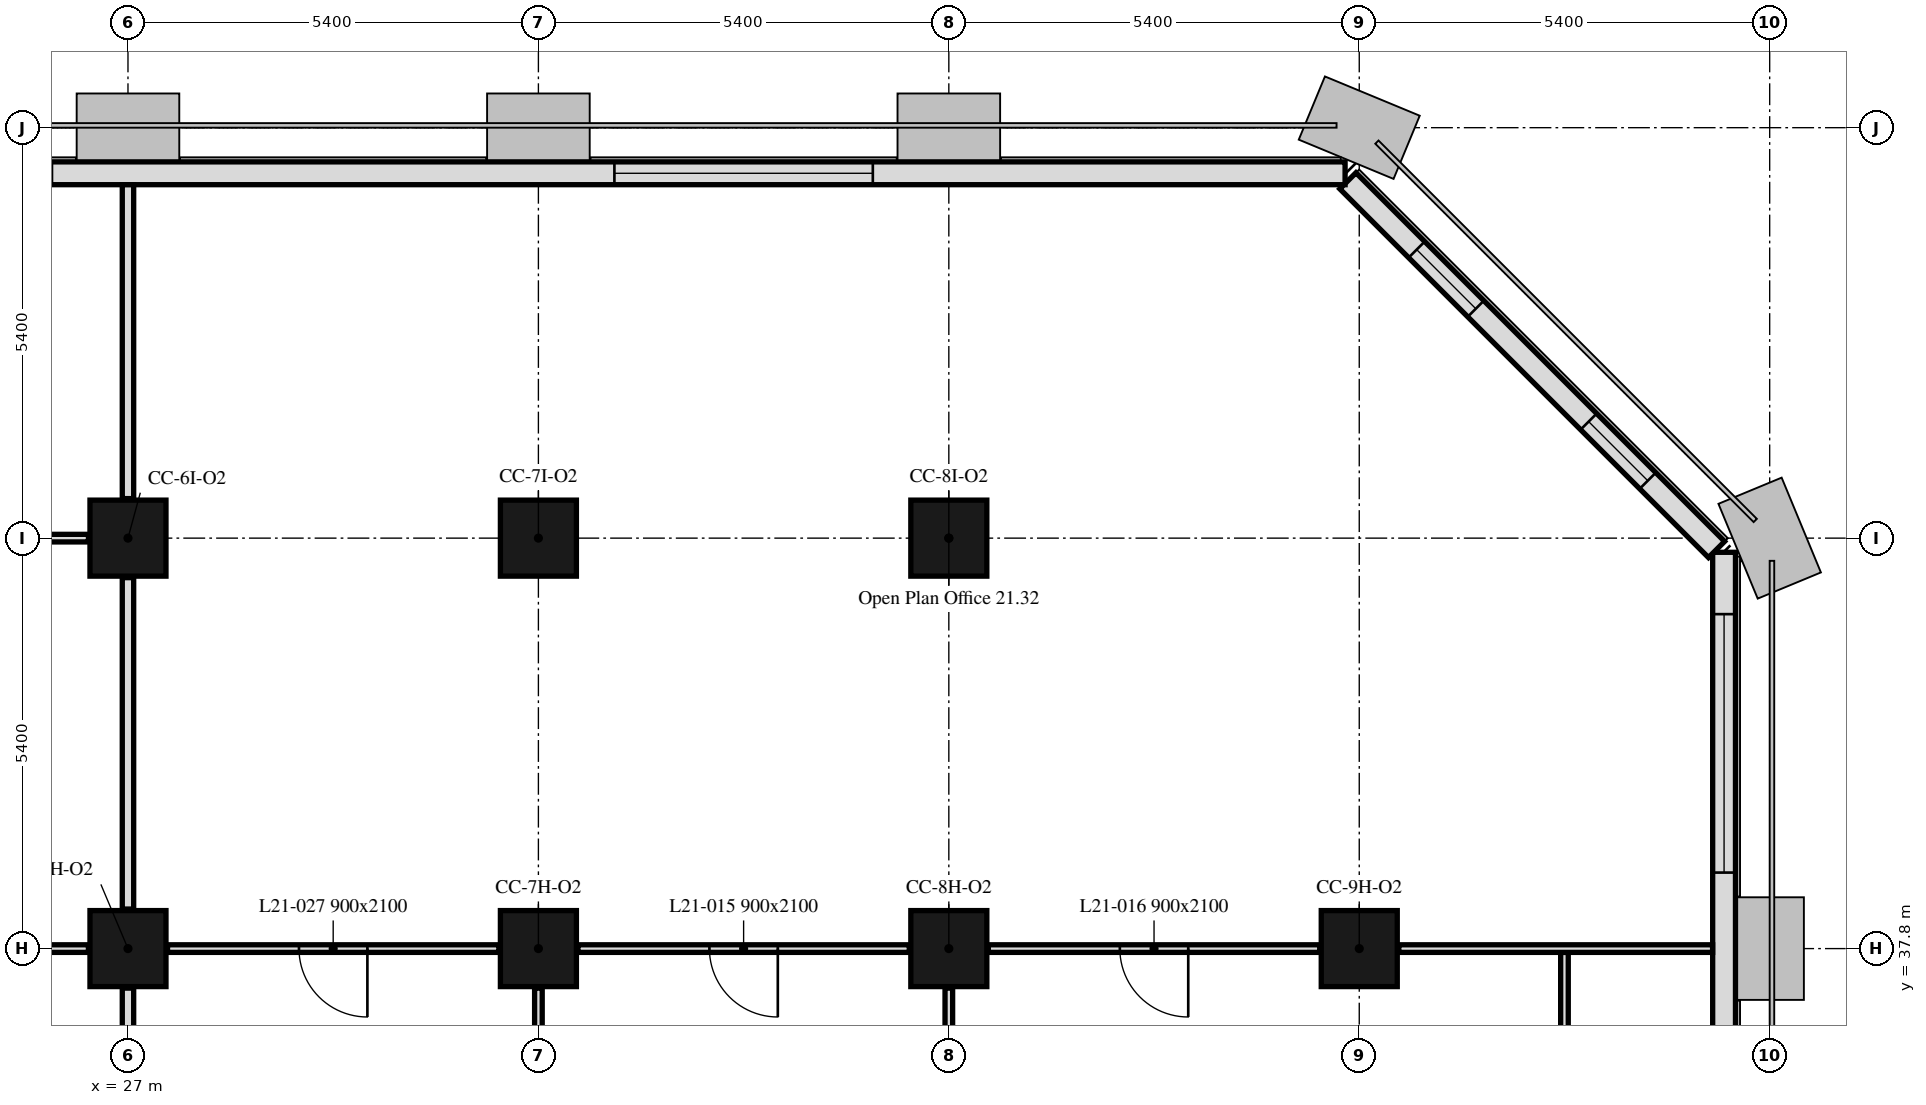
"""IFC4 building model, lengths in metres.
Left out: names, types, materials, properties, quantities, classifications, styles, units other than length and angle.
Written with IfcOpenShell. Run it as: python <this file> out.ifc"""

import sys

from ifc_helpers import new_model, si_unit, direction, frame, frame_2d, origin, origin_2d, place, context, subcontext, project, spatial, rectangle, extrude, element, fill, save


model = new_model("IFC4")
c1 = context("Model", 3, precision=1e-05, world=origin(), true_north=direction((0.0, 1.0)))
c2 = subcontext(c1, "Body", "Model", "MODEL_VIEW")
j1 = project(units=[si_unit("LENGTHUNIT", "METRE"), si_unit("PLANEANGLEUNIT", "RADIAN")], contexts=[c1])
p1 = place(None, origin())
s1 = spatial("IfcSite", under=j1, at=p1, CompositionType="ELEMENT")
p2 = place(p1, origin())
s2 = spatial("IfcBuilding", under=s1, at=p2, CompositionType="ELEMENT")
p3 = place(p2, frame((0.0, 0.0, 91.6)))
s3 = spatial("IfcBuildingStorey", under=s2, at=p3, CompositionType="ELEMENT", Elevation=91.6)
for number, where, z_axis, x_axis in (
    (1, (27.0, 37.8, 0.0), (0.0, 0.0, 1.0), (1.0, 0.0, 0.0)),
    (2, (32.4, 37.8, 0.0), (0.0, 0.0, 1.0), (1.0, 0.0, 0.0)),
    (3, (37.8, 37.8, 0.0), (0.0, 0.0, 1.0), (1.0, 0.0, 0.0)),
    (4, (43.2, 37.8, 0.0), (0.0, 0.0, 1.0), (1.0, 0.0, 0.0)),
    (5, (27.0, 43.2, 0.0), (0.0, 0.0, 1.0), (1.0, 0.0, 0.0)),
    (6, (32.4, 43.2, 0.0), (0.0, 0.0, 1.0), (1.0, 0.0, 0.0)),
    (7, (37.8, 43.2, 0.0), (0.0, 0.0, 1.0), (1.0, 0.0, 0.0)),
):
    element("IfcColumn", number, at=place(p3, frame(where, z_axis=z_axis, x_axis=x_axis)), inside=s3, PredefinedType="COLUMN", context=c2, shape_type="SweptSolid", body=[
        extrude(rectangle(XDim=1.0, YDim=1.0, at=origin_2d()), origin(), (0.0, 0.0, 1.0), 3.5),
    ])
p4 = place(p3, frame((48.0, 10.986, 0.0), z_axis=(0.0, 0.0, 1.0), x_axis=(0.0, 1.0, 0.0)))
e8 = element("IfcWall", 8, at=p4, inside=s3, PredefinedType="SOLIDWALL", context=c2, shape_type="SweptSolid", body=[
    extrude(rectangle(XDim=32.027, YDim=0.3, at=frame_2d((16.014, 0.0))), origin(), (0.0, 0.0, 1.0), 3.5),
])
p5 = place(p4, frame((6.214, 0.0, 0.9)))
e9 = element("IfcOpeningElement", 9, at=p5, cuts=e8, PredefinedType="OPENING", context=c2, shape_type="SweptSolid", body=[
    extrude(rectangle(XDim=3.4, YDim=1.7, at=frame_2d((1.7, 0.85))), frame((0.0, 0.16, 0.0), z_axis=(0.0, -1.0, 0.0), x_axis=(1.0, 0.0, 0.0)), (0.0, 0.0, 1.0), 0.32),
])
p6 = place(p4, frame((17.014, 0.0, 0.9)))
e10 = element("IfcOpeningElement", 10, at=p6, cuts=e8, PredefinedType="OPENING", context=c2, shape_type="SweptSolid", body=[
    extrude(rectangle(XDim=3.4, YDim=1.7, at=frame_2d((1.7, 0.85))), frame((0.0, 0.16, 0.0), z_axis=(0.0, -1.0, 0.0), x_axis=(1.0, 0.0, 0.0)), (0.0, 0.0, 1.0), 0.32),
])
p7 = place(p4, frame((27.814, 0.0, 0.9)))
e11 = element("IfcOpeningElement", 11, at=p7, cuts=e8, PredefinedType="OPENING", context=c2, shape_type="SweptSolid", body=[
    extrude(rectangle(XDim=3.4, YDim=1.7, at=frame_2d((1.7, 0.85))), frame((0.0, 0.16, 0.0), z_axis=(0.0, -1.0, 0.0), x_axis=(1.0, 0.0, 0.0)), (0.0, 0.0, 1.0), 0.32),
])
p8 = place(p3, frame((47.901, 43.051, 0.0), z_axis=(0.0, 0.0, 1.0), x_axis=(-0.707106781187, 0.707106781187, 0.0)))
e12 = element("IfcWall", 12, at=p8, inside=s3, PredefinedType="SOLIDWALL", context=c2, shape_type="SweptSolid", body=[
    extrude(rectangle(XDim=6.86, YDim=0.3, at=frame_2d((3.43, 0.0))), origin(), (0.0, 0.0, 1.0), 3.5),
])
p9 = place(p8, frame((1.28, 0.0, 0.9)))
e13 = element("IfcOpeningElement", 13, at=p9, cuts=e12, PredefinedType="OPENING", context=c2, shape_type="SweptSolid", body=[
    extrude(rectangle(XDim=1.1, YDim=1.7, at=frame_2d((0.55, 0.85))), frame((0.0, 0.16, 0.0), z_axis=(0.0, -1.0, 0.0), x_axis=(1.0, 0.0, 0.0)), (0.0, 0.0, 1.0), 0.32),
])
p10 = place(p8, frame((4.48, 0.0, 0.9)))
e14 = element("IfcOpeningElement", 14, at=p10, cuts=e12, PredefinedType="OPENING", context=c2, shape_type="SweptSolid", body=[
    extrude(rectangle(XDim=1.1, YDim=1.7, at=frame_2d((0.55, 0.85))), frame((0.0, 0.16, 0.0), z_axis=(0.0, -1.0, 0.0), x_axis=(1.0, 0.0, 0.0)), (0.0, 0.0, 1.0), 0.32),
])
p11 = place(p3, frame((43.014, 48.0, 0.0), z_axis=(0.0, 0.0, 1.0), x_axis=(-1.0, 0.0, 0.0)))
e15 = element("IfcWall", 15, at=p11, inside=s3, PredefinedType="SOLIDWALL", context=c2, shape_type="SweptSolid", body=[
    extrude(rectangle(XDim=32.027, YDim=0.3, at=frame_2d((16.014, 0.0))), origin(), (0.0, 0.0, 1.0), 3.5),
])
p12 = place(p11, frame((6.214, 0.0, 0.9)))
e16 = element("IfcOpeningElement", 16, at=p12, cuts=e15, PredefinedType="OPENING", context=c2, shape_type="SweptSolid", body=[
    extrude(rectangle(XDim=3.4, YDim=1.7, at=frame_2d((1.7, 0.85))), frame((0.0, 0.16, 0.0), z_axis=(0.0, -1.0, 0.0), x_axis=(1.0, 0.0, 0.0)), (0.0, 0.0, 1.0), 0.32),
])
p13 = place(p11, frame((17.014, 0.0, 0.9)))
e17 = element("IfcOpeningElement", 17, at=p13, cuts=e15, PredefinedType="OPENING", context=c2, shape_type="SweptSolid", body=[
    extrude(rectangle(XDim=3.4, YDim=1.7, at=frame_2d((1.7, 0.85))), frame((0.0, 0.16, 0.0), z_axis=(0.0, -1.0, 0.0), x_axis=(1.0, 0.0, 0.0)), (0.0, 0.0, 1.0), 0.32),
])
p14 = place(p11, frame((27.814, 0.0, 0.9)))
e18 = element("IfcOpeningElement", 18, at=p14, cuts=e15, PredefinedType="OPENING", context=c2, shape_type="SweptSolid", body=[
    extrude(rectangle(XDim=3.4, YDim=1.7, at=frame_2d((1.7, 0.85))), frame((0.0, 0.16, 0.0), z_axis=(0.0, -1.0, 0.0), x_axis=(1.0, 0.0, 0.0)), (0.0, 0.0, 1.0), 0.32),
])
p15 = place(p3, frame((27.0, 35.175, 0.0), z_axis=(0.0, 0.0, 1.0), x_axis=(0.0, 1.0, 0.0)))
e19 = element("IfcWall", 19, at=p15, inside=s3, PredefinedType="PARTITIONING", context=c2, shape_type="SweptSolid", body=[
    extrude(rectangle(XDim=2.105, YDim=0.15, at=frame_2d((1.052, 0.0))), origin(), (0.0, 0.0, 1.0), 2.75),
])
p16 = place(p3, frame((26.48, 37.8, 0.0), z_axis=(0.0, 0.0, 1.0), x_axis=(-1.0, 0.0, 0.0)))
e20 = element("IfcWall", 20, at=p16, inside=s3, PredefinedType="PARTITIONING", context=c2, shape_type="SweptSolid", body=[
    extrude(rectangle(XDim=4.36, YDim=0.1, at=frame_2d((2.18, 0.0))), origin(), (0.0, 0.0, 1.0), 3.5),
])
p17 = place(p3, frame((26.48, 43.2, 0.0), z_axis=(0.0, 0.0, 1.0), x_axis=(-1.0, 0.0, 0.0)))
e21 = element("IfcWall", 21, at=p17, inside=s3, PredefinedType="PARTITIONING", context=c2, shape_type="SweptSolid", body=[
    extrude(rectangle(XDim=4.36, YDim=0.1, at=frame_2d((2.18, 0.0))), origin(), (0.0, 0.0, 1.0), 3.5),
])
p18 = place(p17, frame((1.73, 0.0, 0.0)))
e22 = element("IfcOpeningElement", 22, at=p18, cuts=e21, PredefinedType="OPENING", context=c2, shape_type="SweptSolid", body=[
    extrude(rectangle(XDim=0.9, YDim=2.1, at=frame_2d((0.45, 1.05))), frame((0.0, 0.05, 0.0), z_axis=(0.0, -1.0, 0.0), x_axis=(1.0, 0.0, 0.0)), (0.0, 0.0, 1.0), 0.1),
])
p19 = place(p3, frame((27.0, 38.32, 0.0), z_axis=(0.0, 0.0, 1.0), x_axis=(0.0, 1.0, 0.0)))
e23 = element("IfcWall", 23, at=p19, inside=s3, PredefinedType="PARTITIONING", context=c2, shape_type="SweptSolid", body=[
    extrude(rectangle(XDim=4.36, YDim=0.15, at=frame_2d((2.18, 0.0))), origin(), (0.0, 0.0, 1.0), 2.75),
])
p20 = place(p3, frame((27.0, 43.72, 0.0), z_axis=(0.0, 0.0, 1.0), x_axis=(0.0, 1.0, 0.0)))
e24 = element("IfcWall", 24, at=p20, inside=s3, PredefinedType="PARTITIONING", context=c2, shape_type="SweptSolid", body=[
    extrude(rectangle(XDim=4.129, YDim=0.15, at=frame_2d((2.064, 0.0))), origin(), (0.0, 0.0, 1.0), 2.75),
])
p21 = place(p3, frame((32.4, 35.175, 0.0), z_axis=(0.0, 0.0, 1.0), x_axis=(0.0, 1.0, 0.0)))
e25 = element("IfcWall", 25, at=p21, inside=s3, PredefinedType="PARTITIONING", context=c2, shape_type="SweptSolid", body=[
    extrude(rectangle(XDim=2.105, YDim=0.1, at=frame_2d((1.052, 0.0))), origin(), (0.0, 0.0, 1.0), 2.75),
])
p22 = place(p3, frame((31.88, 37.8, 0.0), z_axis=(0.0, 0.0, 1.0), x_axis=(-1.0, 0.0, 0.0)))
e26 = element("IfcWall", 26, at=p22, inside=s3, PredefinedType="PARTITIONING", context=c2, shape_type="SweptSolid", body=[
    extrude(rectangle(XDim=4.36, YDim=0.1, at=frame_2d((2.18, 0.0))), origin(), (0.0, 0.0, 1.0), 3.5),
])
p23 = place(p22, frame((1.73, 0.0, 0.0)))
e27 = element("IfcOpeningElement", 27, at=p23, cuts=e26, PredefinedType="OPENING", context=c2, shape_type="SweptSolid", body=[
    extrude(rectangle(XDim=0.9, YDim=2.1, at=frame_2d((0.45, 1.05))), frame((0.0, 0.05, 0.0), z_axis=(0.0, -1.0, 0.0), x_axis=(1.0, 0.0, 0.0)), (0.0, 0.0, 1.0), 0.1),
])
p24 = place(p3, frame((37.8, 35.175, 0.0), z_axis=(0.0, 0.0, 1.0), x_axis=(0.0, 1.0, 0.0)))
e28 = element("IfcWall", 28, at=p24, inside=s3, PredefinedType="PARTITIONING", context=c2, shape_type="SweptSolid", body=[
    extrude(rectangle(XDim=2.105, YDim=0.1, at=frame_2d((1.052, 0.0))), origin(), (0.0, 0.0, 1.0), 2.75),
])
p25 = place(p3, frame((37.28, 37.8, 0.0), z_axis=(0.0, 0.0, 1.0), x_axis=(-1.0, 0.0, 0.0)))
e29 = element("IfcWall", 29, at=p25, inside=s3, PredefinedType="PARTITIONING", context=c2, shape_type="SweptSolid", body=[
    extrude(rectangle(XDim=4.36, YDim=0.1, at=frame_2d((2.18, 0.0))), origin(), (0.0, 0.0, 1.0), 2.75),
])
p26 = place(p25, frame((1.73, 0.0, 0.0)))
e30 = element("IfcOpeningElement", 30, at=p26, cuts=e29, PredefinedType="OPENING", context=c2, shape_type="SweptSolid", body=[
    extrude(rectangle(XDim=0.9, YDim=2.1, at=frame_2d((0.45, 1.05))), frame((0.0, 0.05, 0.0), z_axis=(0.0, -1.0, 0.0), x_axis=(1.0, 0.0, 0.0)), (0.0, 0.0, 1.0), 0.1),
])
p27 = place(p3, frame((45.9, 35.175, 0.0), z_axis=(0.0, 0.0, 1.0), x_axis=(0.0, 1.0, 0.0)))
e31 = element("IfcWall", 31, at=p27, inside=s3, PredefinedType="PARTITIONING", context=c2, shape_type="SweptSolid", body=[
    extrude(rectangle(XDim=2.575, YDim=0.1, at=frame_2d((1.288, 0.0))), origin(), (0.0, 0.0, 1.0), 3.5),
])
p28 = place(p3, frame((42.68, 37.8, 0.0), z_axis=(0.0, 0.0, 1.0), x_axis=(-1.0, 0.0, 0.0)))
e32 = element("IfcWall", 32, at=p28, inside=s3, PredefinedType="PARTITIONING", context=c2, shape_type="SweptSolid", body=[
    extrude(rectangle(XDim=4.36, YDim=0.1, at=frame_2d((2.18, 0.0))), origin(), (0.0, 0.0, 1.0), 2.75),
])
p29 = place(p28, frame((1.73, 0.0, 0.0)))
e33 = element("IfcOpeningElement", 33, at=p29, cuts=e32, PredefinedType="OPENING", context=c2, shape_type="SweptSolid", body=[
    extrude(rectangle(XDim=0.9, YDim=2.1, at=frame_2d((0.45, 1.05))), frame((0.0, 0.05, 0.0), z_axis=(0.0, -1.0, 0.0), x_axis=(1.0, 0.0, 0.0)), (0.0, 0.0, 1.0), 0.1),
])
p30 = place(p3, frame((47.849, 37.8, 0.0), z_axis=(0.0, 0.0, 1.0), x_axis=(-1.0, 0.0, 0.0)))
e34 = element("IfcWall", 34, at=p30, inside=s3, PredefinedType="PARTITIONING", context=c2, shape_type="SweptSolid", body=[
    extrude(rectangle(XDim=4.129, YDim=0.1, at=frame_2d((2.064, 0.0))), origin(), (0.0, 0.0, 1.0), 2.75),
])
p31 = place(p7, origin())
e35 = element("IfcWindow", 35, at=p31, inside=s3, PartitioningType="SINGLE_PANEL", PredefinedType="WINDOW", context=c2, shape_type="SweptSolid", body=[
    extrude(rectangle(XDim=3.4, YDim=1.7, at=frame_2d((1.7, 0.85))), frame((0.0, 0.03, 0.0), z_axis=(0.0, -1.0, 0.0), x_axis=(1.0, 0.0, 0.0)), (0.0, 0.0, 1.0), 0.06),
])
fill(e11, e35)
p32 = place(p9, origin())
e36 = element("IfcWindow", 36, at=p32, inside=s3, PartitioningType="SINGLE_PANEL", PredefinedType="WINDOW", context=c2, shape_type="SweptSolid", body=[
    extrude(rectangle(XDim=1.1, YDim=1.7, at=frame_2d((0.55, 0.85))), frame((0.0, 0.03, 0.0), z_axis=(0.0, -1.0, 0.0), x_axis=(1.0, 0.0, 0.0)), (0.0, 0.0, 1.0), 0.06),
])
fill(e13, e36)
p33 = place(p10, origin())
e37 = element("IfcWindow", 37, at=p33, inside=s3, PartitioningType="SINGLE_PANEL", PredefinedType="WINDOW", context=c2, shape_type="SweptSolid", body=[
    extrude(rectangle(XDim=1.1, YDim=1.7, at=frame_2d((0.55, 0.85))), frame((0.0, 0.03, 0.0), z_axis=(0.0, -1.0, 0.0), x_axis=(1.0, 0.0, 0.0)), (0.0, 0.0, 1.0), 0.06),
])
fill(e14, e37)
p34 = place(p12, origin())
e38 = element("IfcWindow", 38, at=p34, inside=s3, PartitioningType="SINGLE_PANEL", PredefinedType="WINDOW", context=c2, shape_type="SweptSolid", body=[
    extrude(rectangle(XDim=3.4, YDim=1.7, at=frame_2d((1.7, 0.85))), frame((0.0, 0.03, 0.0), z_axis=(0.0, -1.0, 0.0), x_axis=(1.0, 0.0, 0.0)), (0.0, 0.0, 1.0), 0.06),
])
fill(e16, e38)
p35 = place(p26, origin())
e39 = element("IfcDoor", 39, at=p35, inside=s3, OperationType="SINGLE_SWING_LEFT", PredefinedType="DOOR", context=c2, shape_type="SweptSolid", body=[
    extrude(rectangle(XDim=0.9, YDim=2.1, at=frame_2d((0.45, 1.05))), frame((0.0, 0.025, 0.0), z_axis=(0.0, -1.0, 0.0), x_axis=(1.0, 0.0, 0.0)), (0.0, 0.0, 1.0), 0.05),
])
fill(e30, e39)
p36 = place(p29, origin())
e40 = element("IfcDoor", 40, at=p36, inside=s3, OperationType="SINGLE_SWING_LEFT", PredefinedType="DOOR", context=c2, shape_type="SweptSolid", body=[
    extrude(rectangle(XDim=0.9, YDim=2.1, at=frame_2d((0.45, 1.05))), frame((0.0, 0.025, 0.0), z_axis=(0.0, -1.0, 0.0), x_axis=(1.0, 0.0, 0.0)), (0.0, 0.0, 1.0), 0.05),
])
fill(e33, e40)
p37 = place(p23, origin())
e41 = element("IfcDoor", 41, at=p37, inside=s3, OperationType="SINGLE_SWING_RIGHT", PredefinedType="DOOR", context=c2, shape_type="SweptSolid", body=[
    extrude(rectangle(XDim=0.9, YDim=2.1, at=frame_2d((0.45, 1.05))), frame((0.0, 0.025, 0.0), z_axis=(0.0, -1.0, 0.0), x_axis=(1.0, 0.0, 0.0)), (0.0, 0.0, 1.0), 0.05),
])
fill(e27, e41)
save(model, sys.argv[1])
